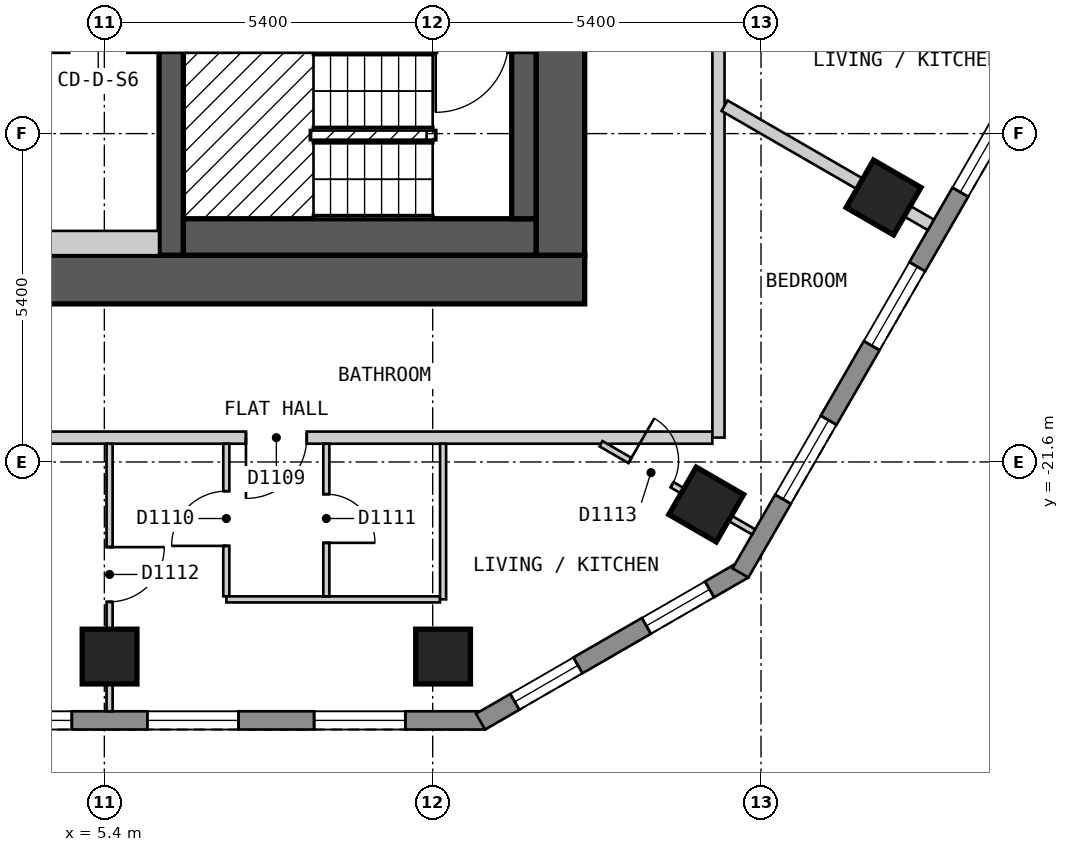
"""IFC4 building model, lengths in metres.
Left out: names, types, materials, properties, quantities, classifications, styles, units other than length and angle.
Written with IfcOpenShell. Run it as: python <this file> out.ifc"""

import sys

from ifc_helpers import new_model, si_unit, direction, frame, frame_2d, origin, origin_2d, place, context, subcontext, project, spatial, polyline, rectangle, outline, extrude, element, fill, save


model = new_model("IFC4")
c1 = context("Model", 3, precision=1e-05, world=origin(), true_north=direction((0.0, 1.0)))
c2 = subcontext(c1, "Body", "Model", "MODEL_VIEW")
j1 = project(units=[si_unit("LENGTHUNIT", "METRE"), si_unit("PLANEANGLEUNIT", "RADIAN")], contexts=[c1])
p1 = place(None, origin())
s1 = spatial("IfcSite", under=j1, at=p1, CompositionType="ELEMENT")
p2 = place(p1, origin())
s2 = spatial("IfcBuilding", under=s1, at=p2, CompositionType="ELEMENT")
p3 = place(p2, frame((0.0, 0.0, 138.6)))
s3 = spatial("IfcBuildingStorey", under=s2, at=p3, CompositionType="ELEMENT", Elevation=138.6)
for number, where, z_axis, x_axis in (
    (1, (5.486, -24.8, 0.0), (0.0, 0.0, 1.0), (1.0, 0.0, 0.0)),
    (2, (10.971, -24.8, 0.0), (0.0, 0.0, 1.0), (1.0, 0.0, 0.0)),
    (3, (15.299, -22.3, 0.0), (0.0, 0.0, 1.0), (0.5, 0.866, 0.0)),
    (4, (18.215, -17.251, 0.0), (0.0, 0.0, 1.0), (0.5, 0.866, 0.0)),
):
    element("IfcColumn", number, at=place(p3, frame(where, z_axis=z_axis, x_axis=x_axis)), inside=s3, PredefinedType="COLUMN", context=c2, shape_type="SweptSolid", body=[
        extrude(rectangle(XDim=0.9, YDim=0.9, at=origin_2d()), origin(), (0.0, 0.0, 1.0), 3.0),
    ])
p4 = place(p3, frame((-13.3, -18.6, 0.0), z_axis=(0.0, 0.0, 1.0), x_axis=(1.0, 0.0, 0.0)))
e5 = element("IfcWall", 5, at=p4, inside=s3, PredefinedType="SHEAR", context=c2, shape_type="SweptSolid", body=[
    extrude(rectangle(XDim=26.6, YDim=0.8, at=frame_2d((13.3, 0.0))), origin(), (0.0, 0.0, 1.0), 2.7),
])
p5 = place(p3, frame((12.9, -18.2, 0.0), z_axis=(0.0, 0.0, 1.0), x_axis=(0.0, 1.0, 0.0)))
e6 = element("IfcWall", 6, at=p5, inside=s3, PredefinedType="SHEAR", context=c2, shape_type="SweptSolid", body=[
    extrude(rectangle(XDim=12.4, YDim=0.8, at=frame_2d((6.2, 0.0))), origin(), (0.0, 0.0, 1.0), 2.7),
])
p6 = place(p3, frame((6.5, -18.2, 0.0), z_axis=(0.0, 0.0, 1.0), x_axis=(0.0, 1.0, 0.0)))
e7 = element("IfcWall", 7, at=p6, inside=s3, PredefinedType="SHEAR", context=c2, shape_type="SweptSolid", body=[
    extrude(rectangle(XDim=3.35, YDim=0.4, at=frame_2d((1.675, 0.0))), origin(), (0.0, 0.0, 1.0), 2.7),
])
p7 = place(p3, frame((-11.662, -25.85, 0.0), z_axis=(0.0, 0.0, 1.0), x_axis=(1.0, 0.0, 0.0)))
e8 = element("IfcWall", 8, at=p7, inside=s3, PredefinedType="SOLIDWALL", context=c2, shape_type="SweptSolid", body=[
    extrude(outline(polyline([(0.0, -0.15), (23.324, -0.15), (23.244, 0.15), (0.08, 0.15), (0.0, -0.15)])), origin(), (0.0, 0.0, 1.0), 2.7),
])
p8 = place(p7, frame((1.314, 0.0, 0.15)))
e9 = element("IfcOpeningElement", 9, at=p8, cuts=e8, PredefinedType="OPENING", context=c2, shape_type="SweptSolid", body=[
    extrude(rectangle(XDim=1.5, YDim=2.1, at=frame_2d((0.75, 1.05))), frame((0.0, 0.16, 0.0), z_axis=(0.0, -1.0, 0.0), x_axis=(1.0, 0.0, 0.0)), (0.0, 0.0, 1.0), 0.32),
])
p9 = place(p7, frame((4.057, 0.0, 0.15)))
e10 = element("IfcOpeningElement", 10, at=p9, cuts=e8, PredefinedType="OPENING", context=c2, shape_type="SweptSolid", body=[
    extrude(rectangle(XDim=1.5, YDim=2.1, at=frame_2d((0.75, 1.05))), frame((0.0, 0.16, 0.0), z_axis=(0.0, -1.0, 0.0), x_axis=(1.0, 0.0, 0.0)), (0.0, 0.0, 1.0), 0.32),
])
p10 = place(p7, frame((6.799, 0.0, 0.15)))
e11 = element("IfcOpeningElement", 11, at=p10, cuts=e8, PredefinedType="OPENING", context=c2, shape_type="SweptSolid", body=[
    extrude(rectangle(XDim=1.5, YDim=2.1, at=frame_2d((0.75, 1.05))), frame((0.0, 0.16, 0.0), z_axis=(0.0, -1.0, 0.0), x_axis=(1.0, 0.0, 0.0)), (0.0, 0.0, 1.0), 0.32),
])
p11 = place(p7, frame((9.542, 0.0, 0.15)))
e12 = element("IfcOpeningElement", 12, at=p11, cuts=e8, PredefinedType="OPENING", context=c2, shape_type="SweptSolid", body=[
    extrude(rectangle(XDim=1.5, YDim=2.1, at=frame_2d((0.75, 1.05))), frame((0.0, 0.16, 0.0), z_axis=(0.0, -1.0, 0.0), x_axis=(1.0, 0.0, 0.0)), (0.0, 0.0, 1.0), 0.32),
])
p12 = place(p7, frame((12.284, 0.0, 0.15)))
e13 = element("IfcOpeningElement", 13, at=p12, cuts=e8, PredefinedType="OPENING", context=c2, shape_type="SweptSolid", body=[
    extrude(rectangle(XDim=1.5, YDim=2.1, at=frame_2d((0.75, 1.05))), frame((0.0, 0.16, 0.0), z_axis=(0.0, -1.0, 0.0), x_axis=(1.0, 0.0, 0.0)), (0.0, 0.0, 1.0), 0.32),
])
p13 = place(p7, frame((15.027, 0.0, 0.15)))
e14 = element("IfcOpeningElement", 14, at=p13, cuts=e8, PredefinedType="OPENING", context=c2, shape_type="SweptSolid", body=[
    extrude(rectangle(XDim=1.5, YDim=2.1, at=frame_2d((0.75, 1.05))), frame((0.0, 0.16, 0.0), z_axis=(0.0, -1.0, 0.0), x_axis=(1.0, 0.0, 0.0)), (0.0, 0.0, 1.0), 0.32),
])
p14 = place(p7, frame((17.769, 0.0, 0.15)))
e15 = element("IfcOpeningElement", 15, at=p14, cuts=e8, PredefinedType="OPENING", context=c2, shape_type="SweptSolid", body=[
    extrude(rectangle(XDim=1.5, YDim=2.1, at=frame_2d((0.75, 1.05))), frame((0.0, 0.16, 0.0), z_axis=(0.0, -1.0, 0.0), x_axis=(1.0, 0.0, 0.0)), (0.0, 0.0, 1.0), 0.32),
])
p15 = place(p7, frame((20.512, 0.0, 0.15)))
e16 = element("IfcOpeningElement", 16, at=p15, cuts=e8, PredefinedType="OPENING", context=c2, shape_type="SweptSolid", body=[
    extrude(rectangle(XDim=1.5, YDim=2.1, at=frame_2d((0.75, 1.05))), frame((0.0, 0.16, 0.0), z_axis=(0.0, -1.0, 0.0), x_axis=(1.0, 0.0, 0.0)), (0.0, 0.0, 1.0), 0.32),
])
p16 = place(p3, frame((11.587, -25.87, 0.0), z_axis=(0.0, 0.0, 1.0), x_axis=(0.866022959057, 0.500004234368, 0.0)))
e17 = element("IfcWall", 17, at=p16, inside=s3, PredefinedType="SOLIDWALL", context=c2, shape_type="SweptSolid", body=[
    extrude(outline(polyline([(0.0, -0.15), (5.0, -0.15), (4.92, 0.15), (0.08, 0.15), (0.0, -0.15)])), origin(), (0.0, 0.0, 1.0), 2.7),
])
p17 = place(p16, frame((0.65, 0.0, 0.15)))
e18 = element("IfcOpeningElement", 18, at=p17, cuts=e17, PredefinedType="OPENING", context=c2, shape_type="SweptSolid", body=[
    extrude(rectangle(XDim=1.2, YDim=2.1, at=frame_2d((0.6, 1.05))), frame((0.0, 0.16, 0.0), z_axis=(0.0, -1.0, 0.0), x_axis=(1.0, 0.0, 0.0)), (0.0, 0.0, 1.0), 0.32),
])
p18 = place(p16, frame((3.149, 0.0, 0.15)))
e19 = element("IfcOpeningElement", 19, at=p18, cuts=e17, PredefinedType="OPENING", context=c2, shape_type="SweptSolid", body=[
    extrude(rectangle(XDim=1.2, YDim=2.1, at=frame_2d((0.6, 1.05))), frame((0.0, 0.16, 0.0), z_axis=(0.0, -1.0, 0.0), x_axis=(1.0, 0.0, 0.0)), (0.0, 0.0, 1.0), 0.32),
])
p19 = place(p3, frame((15.862, -23.425, 0.0), z_axis=(0.0, 0.0, 1.0), x_axis=(0.500017503135, 0.866015298109, 0.0)))
e20 = element("IfcWall", 20, at=p19, inside=s3, PredefinedType="SOLIDWALL", context=c2, shape_type="SweptSolid", body=[
    extrude(outline(polyline([(0.0, -0.15), (24.711, -0.15), (24.631, 0.15), (0.08, 0.15), (0.0, -0.15)])), origin(), (0.0, 0.0, 1.0), 2.7),
])
p20 = place(p19, frame((1.4, 0.0, 0.15)))
e21 = element("IfcOpeningElement", 21, at=p20, cuts=e20, PredefinedType="OPENING", context=c2, shape_type="SweptSolid", body=[
    extrude(rectangle(XDim=1.5, YDim=2.1, at=frame_2d((0.75, 1.05))), frame((0.0, 0.16, 0.0), z_axis=(0.0, -1.0, 0.0), x_axis=(1.0, 0.0, 0.0)), (0.0, 0.0, 1.0), 0.32),
])
p21 = place(p19, frame((4.316, 0.0, 0.15)))
e22 = element("IfcOpeningElement", 22, at=p21, cuts=e20, PredefinedType="OPENING", context=c2, shape_type="SweptSolid", body=[
    extrude(rectangle(XDim=1.5, YDim=2.1, at=frame_2d((0.75, 1.05))), frame((0.0, 0.16, 0.0), z_axis=(0.0, -1.0, 0.0), x_axis=(1.0, 0.0, 0.0)), (0.0, 0.0, 1.0), 0.32),
])
p22 = place(p19, frame((7.231, 0.0, 0.15)))
e23 = element("IfcOpeningElement", 23, at=p22, cuts=e20, PredefinedType="OPENING", context=c2, shape_type="SweptSolid", body=[
    extrude(rectangle(XDim=1.5, YDim=2.1, at=frame_2d((0.75, 1.05))), frame((0.0, 0.16, 0.0), z_axis=(0.0, -1.0, 0.0), x_axis=(1.0, 0.0, 0.0)), (0.0, 0.0, 1.0), 0.32),
])
p23 = place(p19, frame((10.147, 0.0, 0.15)))
e24 = element("IfcOpeningElement", 24, at=p23, cuts=e20, PredefinedType="OPENING", context=c2, shape_type="SweptSolid", body=[
    extrude(rectangle(XDim=1.5, YDim=2.1, at=frame_2d((0.75, 1.05))), frame((0.0, 0.16, 0.0), z_axis=(0.0, -1.0, 0.0), x_axis=(1.0, 0.0, 0.0)), (0.0, 0.0, 1.0), 0.32),
])
p24 = place(p19, frame((13.062, 0.0, 0.15)))
e25 = element("IfcOpeningElement", 25, at=p24, cuts=e20, PredefinedType="OPENING", context=c2, shape_type="SweptSolid", body=[
    extrude(rectangle(XDim=1.5, YDim=2.1, at=frame_2d((0.75, 1.05))), frame((0.0, 0.16, 0.0), z_axis=(0.0, -1.0, 0.0), x_axis=(1.0, 0.0, 0.0)), (0.0, 0.0, 1.0), 0.32),
])
p25 = place(p19, frame((15.977, 0.0, 0.15)))
e26 = element("IfcOpeningElement", 26, at=p25, cuts=e20, PredefinedType="OPENING", context=c2, shape_type="SweptSolid", body=[
    extrude(rectangle(XDim=1.5, YDim=2.1, at=frame_2d((0.75, 1.05))), frame((0.0, 0.16, 0.0), z_axis=(0.0, -1.0, 0.0), x_axis=(1.0, 0.0, 0.0)), (0.0, 0.0, 1.0), 0.32),
])
p26 = place(p19, frame((18.893, 0.0, 0.15)))
e27 = element("IfcOpeningElement", 27, at=p26, cuts=e20, PredefinedType="OPENING", context=c2, shape_type="SweptSolid", body=[
    extrude(rectangle(XDim=1.5, YDim=2.1, at=frame_2d((0.75, 1.05))), frame((0.0, 0.16, 0.0), z_axis=(0.0, -1.0, 0.0), x_axis=(1.0, 0.0, 0.0)), (0.0, 0.0, 1.0), 0.32),
])
p27 = place(p19, frame((21.809, 0.0, 0.15)))
e28 = element("IfcOpeningElement", 28, at=p27, cuts=e20, PredefinedType="OPENING", context=c2, shape_type="SweptSolid", body=[
    extrude(rectangle(XDim=1.5, YDim=2.1, at=frame_2d((0.75, 1.05))), frame((0.0, 0.16, 0.0), z_axis=(0.0, -1.0, 0.0), x_axis=(1.0, 0.0, 0.0)), (0.0, 0.0, 1.0), 0.32),
])
p28 = place(p3, frame((-15.499, -21.2, 0.0), z_axis=(0.0, 0.0, 1.0), x_axis=(1.0, 0.0, 0.0)))
e29 = element("IfcWall", 29, at=p28, inside=s3, PredefinedType="PARTITIONING", context=c2, shape_type="SweptSolid", body=[
    extrude(rectangle(XDim=30.898, YDim=0.2, at=frame_2d((15.449, 0.0))), origin(), (0.0, 0.0, 1.0), 2.7),
])
p29 = place(p28, frame((6.773, 0.0, 0.0)))
e30 = element("IfcOpeningElement", 30, at=p29, cuts=e29, PredefinedType="OPENING", context=c2, shape_type="SweptSolid", body=[
    extrude(rectangle(XDim=1.0, YDim=2.1, at=frame_2d((0.5, 1.05))), frame((0.0, 0.11, 0.0), z_axis=(0.0, -1.0, 0.0), x_axis=(1.0, 0.0, 0.0)), (0.0, 0.0, 1.0), 0.22),
])
p30 = place(p28, frame((23.228, 0.0, 0.0)))
e31 = element("IfcOpeningElement", 31, at=p30, cuts=e29, PredefinedType="OPENING", context=c2, shape_type="SweptSolid", body=[
    extrude(rectangle(XDim=1.0, YDim=2.1, at=frame_2d((0.5, 1.05))), frame((0.0, 0.11, 0.0), z_axis=(0.0, -1.0, 0.0), x_axis=(1.0, 0.0, 0.0)), (0.0, 0.0, 1.0), 0.22),
])
p31 = place(p3, frame((15.5, -21.199, 0.0), z_axis=(0.0, 0.0, 1.0), x_axis=(0.0, 1.0, 0.0)))
e32 = element("IfcWall", 32, at=p31, inside=s3, PredefinedType="PARTITIONING", context=c2, shape_type="SweptSolid", body=[
    extrude(rectangle(XDim=12.147, YDim=0.2, at=frame_2d((6.073, 0.0))), origin(), (0.0, 0.0, 1.0), 2.7),
])
p32 = place(p31, frame((8.348, 0.0, 0.0)))
e33 = element("IfcOpeningElement", 33, at=p32, cuts=e32, PredefinedType="OPENING", context=c2, shape_type="SweptSolid", body=[
    extrude(rectangle(XDim=1.0, YDim=2.1, at=frame_2d((0.5, 1.05))), frame((0.0, 0.11, 0.0), z_axis=(0.0, -1.0, 0.0), x_axis=(1.0, 0.0, 0.0)), (0.0, 0.0, 1.0), 0.22),
])
p33 = place(p3, frame((7.406, -21.3, 0.0), z_axis=(0.0, 0.0, 1.0), x_axis=(0.0, -1.0, 0.0)))
e34 = element("IfcWall", 34, at=p33, inside=s3, PredefinedType="PARTITIONING", context=c2, shape_type="SweptSolid", body=[
    extrude(rectangle(XDim=2.509, YDim=0.1, at=frame_2d((1.254, 0.0))), origin(), (0.0, 0.0, 1.0), 2.7),
])
p34 = place(p33, frame((0.78, 0.0, 0.0)))
e35 = element("IfcOpeningElement", 35, at=p34, cuts=e34, PredefinedType="OPENING", context=c2, shape_type="SweptSolid", body=[
    extrude(rectangle(XDim=0.9, YDim=2.1, at=frame_2d((0.45, 1.05))), frame((0.0, 0.06, 0.0), z_axis=(0.0, -1.0, 0.0), x_axis=(1.0, 0.0, 0.0)), (0.0, 0.0, 1.0), 0.12),
])
p35 = place(p3, frame((13.568, -21.3, 0.0), z_axis=(0.0, 0.0, 1.0), x_axis=(0.865885342641, -0.500242514586, 0.0)))
e36 = element("IfcWall", 36, at=p35, inside=s3, PredefinedType="PARTITIONING", context=c2, shape_type="SweptSolid", body=[
    extrude(rectangle(XDim=2.898, YDim=0.1, at=frame_2d((1.449, 0.0))), origin(), (0.0, 0.0, 1.0), 2.7),
])
p36 = place(p35, frame((0.55, 0.0, 0.0)))
e37 = element("IfcOpeningElement", 37, at=p36, cuts=e36, PredefinedType="OPENING", context=c2, shape_type="SweptSolid", body=[
    extrude(rectangle(XDim=0.8, YDim=2.1, at=frame_2d((0.4, 1.05))), frame((0.0, 0.06, 0.0), z_axis=(0.0, -1.0, 0.0), x_axis=(1.0, 0.0, 0.0)), (0.0, 0.0, 1.0), 0.12),
])
p37 = place(p3, frame((7.407, -23.86, 0.0), z_axis=(0.0, 0.0, 1.0), x_axis=(1.0, 0.0, 0.0)))
e38 = element("IfcWall", 38, at=p37, inside=s3, PredefinedType="PARTITIONING", context=c2, shape_type="SweptSolid", body=[
    extrude(rectangle(XDim=3.513, YDim=0.1, at=frame_2d((1.756, 0.0))), origin(), (0.0, 0.0, 1.0), 2.7),
])
p38 = place(p3, frame((5.486, -25.7, 0.0), z_axis=(0.0, 0.0, 1.0), x_axis=(0.0, 1.0, 0.0)))
e39 = element("IfcWall", 39, at=p38, inside=s3, PredefinedType="PARTITIONING", context=c2, shape_type="SweptSolid", body=[
    extrude(rectangle(XDim=4.4, YDim=0.1, at=frame_2d((2.2, 0.0))), origin(), (0.0, 0.0, 1.0), 2.7),
])
p39 = place(p38, frame((1.8, 0.0, 0.0)))
e40 = element("IfcOpeningElement", 40, at=p39, cuts=e39, PredefinedType="OPENING", context=c2, shape_type="SweptSolid", body=[
    extrude(rectangle(XDim=0.9, YDim=2.1, at=frame_2d((0.45, 1.05))), frame((0.0, 0.06, 0.0), z_axis=(0.0, -1.0, 0.0), x_axis=(1.0, 0.0, 0.0)), (0.0, 0.0, 1.0), 0.12),
])
p40 = place(p3, frame((9.051, -23.81, 0.0), z_axis=(0.0, 0.0, 1.0), x_axis=(0.0, 1.0, 0.0)))
e41 = element("IfcWall", 41, at=p40, inside=s3, PredefinedType="PARTITIONING", context=c2, shape_type="SweptSolid", body=[
    extrude(rectangle(XDim=2.51, YDim=0.1, at=frame_2d((1.255, 0.0))), origin(), (0.0, 0.0, 1.0), 2.7),
])
p41 = place(p40, frame((0.88, 0.0, 0.0)))
e42 = element("IfcOpeningElement", 42, at=p41, cuts=e41, PredefinedType="OPENING", context=c2, shape_type="SweptSolid", body=[
    extrude(rectangle(XDim=0.8, YDim=2.1, at=frame_2d((0.4, 1.05))), frame((0.0, 0.06, 0.0), z_axis=(0.0, -1.0, 0.0), x_axis=(1.0, 0.0, 0.0)), (0.0, 0.0, 1.0), 0.12),
])
p42 = place(p3, frame((10.971, -23.859, 0.0), z_axis=(0.0, 0.0, 1.0), x_axis=(0.0, 1.0, 0.0)))
e43 = element("IfcWall", 43, at=p42, inside=s3, PredefinedType="PARTITIONING", context=c2, shape_type="SweptSolid", body=[
    extrude(rectangle(XDim=2.559, YDim=0.1, at=frame_2d((1.279, 0.0))), origin(), (0.0, 0.0, 1.0), 2.7),
])
p43 = place(p3, frame((15.6, -15.741, 0.0), z_axis=(0.0, 0.0, 1.0), x_axis=(0.865964599155, -0.500105301922, 0.0)))
e44 = element("IfcWall", 44, at=p43, inside=s3, PredefinedType="PARTITIONING", context=c2, shape_type="SweptSolid", body=[
    extrude(rectangle(XDim=3.919, YDim=0.2, at=frame_2d((1.959, 0.0))), origin(), (0.0, 0.0, 1.0), 2.7),
])
p44 = place(p3, frame((-6.3, -18.0, 0.0), z_axis=(0.0, 0.0, 1.0), x_axis=(1.0, 0.0, 0.0)))
e45 = element("IfcWall", 45, at=p44, inside=s3, PredefinedType="PARTITIONING", context=c2, shape_type="SweptSolid", body=[
    extrude(rectangle(XDim=12.6, YDim=0.4, at=frame_2d((6.3, 0.0))), origin(), (0.0, 0.0, 1.0), 2.7),
])
p45 = place(p3, frame((6.7, -17.9, 0.0), z_axis=(0.0, 0.0, 1.0), x_axis=(1.0, 0.0, 0.0)))
e46 = element("IfcWall", 46, at=p45, inside=s3, PredefinedType="SOLIDWALL", context=c2, shape_type="SweptSolid", body=[
    extrude(rectangle(XDim=5.8, YDim=0.6, at=frame_2d((2.9, 0.0))), origin(), (0.0, 0.0, 1.0), 2.7),
])
p46 = place(p3, frame((12.3, -17.6, 0.0), z_axis=(0.0, 0.0, 1.0), x_axis=(0.0, 1.0, 0.0)))
e47 = element("IfcWall", 47, at=p46, inside=s3, PredefinedType="SOLIDWALL", context=c2, shape_type="SweptSolid", body=[
    extrude(rectangle(XDim=2.75, YDim=0.4, at=frame_2d((1.375, 0.0))), origin(), (0.0, 0.0, 1.0), 2.7),
])
p47 = place(p13, origin())
e48 = element("IfcWindow", 48, at=p47, inside=s3, PartitioningType="SINGLE_PANEL", PredefinedType="WINDOW", context=c2, shape_type="SweptSolid", body=[
    extrude(rectangle(XDim=1.5, YDim=2.1, at=frame_2d((0.75, 1.05))), frame((0.0, 0.03, 0.0), z_axis=(0.0, -1.0, 0.0), x_axis=(1.0, 0.0, 0.0)), (0.0, 0.0, 1.0), 0.06),
])
fill(e14, e48)
p48 = place(p14, origin())
e49 = element("IfcWindow", 49, at=p48, inside=s3, PartitioningType="SINGLE_PANEL", PredefinedType="WINDOW", context=c2, shape_type="SweptSolid", body=[
    extrude(rectangle(XDim=1.5, YDim=2.1, at=frame_2d((0.75, 1.05))), frame((0.0, 0.03, 0.0), z_axis=(0.0, -1.0, 0.0), x_axis=(1.0, 0.0, 0.0)), (0.0, 0.0, 1.0), 0.06),
])
fill(e15, e49)
p49 = place(p15, origin())
e50 = element("IfcWindow", 50, at=p49, inside=s3, PartitioningType="SINGLE_PANEL", PredefinedType="WINDOW", context=c2, shape_type="SweptSolid", body=[
    extrude(rectangle(XDim=1.5, YDim=2.1, at=frame_2d((0.75, 1.05))), frame((0.0, 0.03, 0.0), z_axis=(0.0, -1.0, 0.0), x_axis=(1.0, 0.0, 0.0)), (0.0, 0.0, 1.0), 0.06),
])
fill(e16, e50)
p50 = place(p17, origin())
e51 = element("IfcWindow", 51, at=p50, inside=s3, PartitioningType="SINGLE_PANEL", PredefinedType="WINDOW", context=c2, shape_type="SweptSolid", body=[
    extrude(rectangle(XDim=1.2, YDim=2.1, at=frame_2d((0.6, 1.05))), frame((0.0, 0.03, 0.0), z_axis=(0.0, -1.0, 0.0), x_axis=(1.0, 0.0, 0.0)), (0.0, 0.0, 1.0), 0.06),
])
fill(e18, e51)
p51 = place(p18, origin())
e52 = element("IfcWindow", 52, at=p51, inside=s3, PartitioningType="SINGLE_PANEL", PredefinedType="WINDOW", context=c2, shape_type="SweptSolid", body=[
    extrude(rectangle(XDim=1.2, YDim=2.1, at=frame_2d((0.6, 1.05))), frame((0.0, 0.03, 0.0), z_axis=(0.0, -1.0, 0.0), x_axis=(1.0, 0.0, 0.0)), (0.0, 0.0, 1.0), 0.06),
])
fill(e19, e52)
p52 = place(p20, origin())
e53 = element("IfcWindow", 53, at=p52, inside=s3, PartitioningType="SINGLE_PANEL", PredefinedType="WINDOW", context=c2, shape_type="SweptSolid", body=[
    extrude(rectangle(XDim=1.5, YDim=2.1, at=frame_2d((0.75, 1.05))), frame((0.0, 0.03, 0.0), z_axis=(0.0, -1.0, 0.0), x_axis=(1.0, 0.0, 0.0)), (0.0, 0.0, 1.0), 0.06),
])
fill(e21, e53)
p53 = place(p21, origin())
e54 = element("IfcWindow", 54, at=p53, inside=s3, PartitioningType="SINGLE_PANEL", PredefinedType="WINDOW", context=c2, shape_type="SweptSolid", body=[
    extrude(rectangle(XDim=1.5, YDim=2.1, at=frame_2d((0.75, 1.05))), frame((0.0, 0.03, 0.0), z_axis=(0.0, -1.0, 0.0), x_axis=(1.0, 0.0, 0.0)), (0.0, 0.0, 1.0), 0.06),
])
fill(e22, e54)
p54 = place(p22, origin())
e55 = element("IfcWindow", 55, at=p54, inside=s3, PartitioningType="SINGLE_PANEL", PredefinedType="WINDOW", context=c2, shape_type="SweptSolid", body=[
    extrude(rectangle(XDim=1.5, YDim=2.1, at=frame_2d((0.75, 1.05))), frame((0.0, 0.03, 0.0), z_axis=(0.0, -1.0, 0.0), x_axis=(1.0, 0.0, 0.0)), (0.0, 0.0, 1.0), 0.06),
])
fill(e23, e55)
p55 = place(p30, origin())
e56 = element("IfcDoor", 56, at=p55, inside=s3, OperationType="SINGLE_SWING_LEFT", PredefinedType="DOOR", context=c2, shape_type="SweptSolid", body=[
    extrude(rectangle(XDim=1.0, YDim=2.1, at=frame_2d((0.5, 1.05))), frame((0.0, 0.025, 0.0), z_axis=(0.0, -1.0, 0.0), x_axis=(1.0, 0.0, 0.0)), (0.0, 0.0, 1.0), 0.05),
])
fill(e31, e56)
p56 = place(p34, origin())
e57 = element("IfcDoor", 57, at=p56, inside=s3, OperationType="SINGLE_SWING_RIGHT", PredefinedType="DOOR", context=c2, shape_type="SweptSolid", body=[
    extrude(rectangle(XDim=0.9, YDim=2.1, at=frame_2d((0.45, 1.05))), frame((0.0, 0.025, 0.0), z_axis=(0.0, -1.0, 0.0), x_axis=(1.0, 0.0, 0.0)), (0.0, 0.0, 1.0), 0.05),
])
fill(e35, e57)
p57 = place(p41, origin())
e58 = element("IfcDoor", 58, at=p57, inside=s3, OperationType="SINGLE_SWING_LEFT", PredefinedType="DOOR", context=c2, shape_type="SweptSolid", body=[
    extrude(rectangle(XDim=0.8, YDim=2.1, at=frame_2d((0.4, 1.05))), frame((0.0, 0.025, 0.0), z_axis=(0.0, -1.0, 0.0), x_axis=(1.0, 0.0, 0.0)), (0.0, 0.0, 1.0), 0.05),
])
fill(e42, e58)
p58 = place(p39, origin())
e59 = element("IfcDoor", 59, at=p58, inside=s3, OperationType="SINGLE_SWING_RIGHT", PredefinedType="DOOR", context=c2, shape_type="SweptSolid", body=[
    extrude(rectangle(XDim=0.9, YDim=2.1, at=frame_2d((0.45, 1.05))), frame((0.0, 0.025, 0.0), z_axis=(0.0, -1.0, 0.0), x_axis=(1.0, 0.0, 0.0)), (0.0, 0.0, 1.0), 0.05),
])
fill(e40, e59)
p59 = place(p36, origin())
e60 = element("IfcDoor", 60, at=p59, inside=s3, OperationType="SINGLE_SWING_LEFT", PredefinedType="DOOR", context=c2, shape_type="SweptSolid", body=[
    extrude(rectangle(XDim=0.8, YDim=2.1, at=frame_2d((0.4, 1.05))), frame((0.0, 0.025, 0.0), z_axis=(0.0, -1.0, 0.0), x_axis=(1.0, 0.0, 0.0)), (0.0, 0.0, 1.0), 0.05),
])
fill(e37, e60)
save(model, sys.argv[1])
